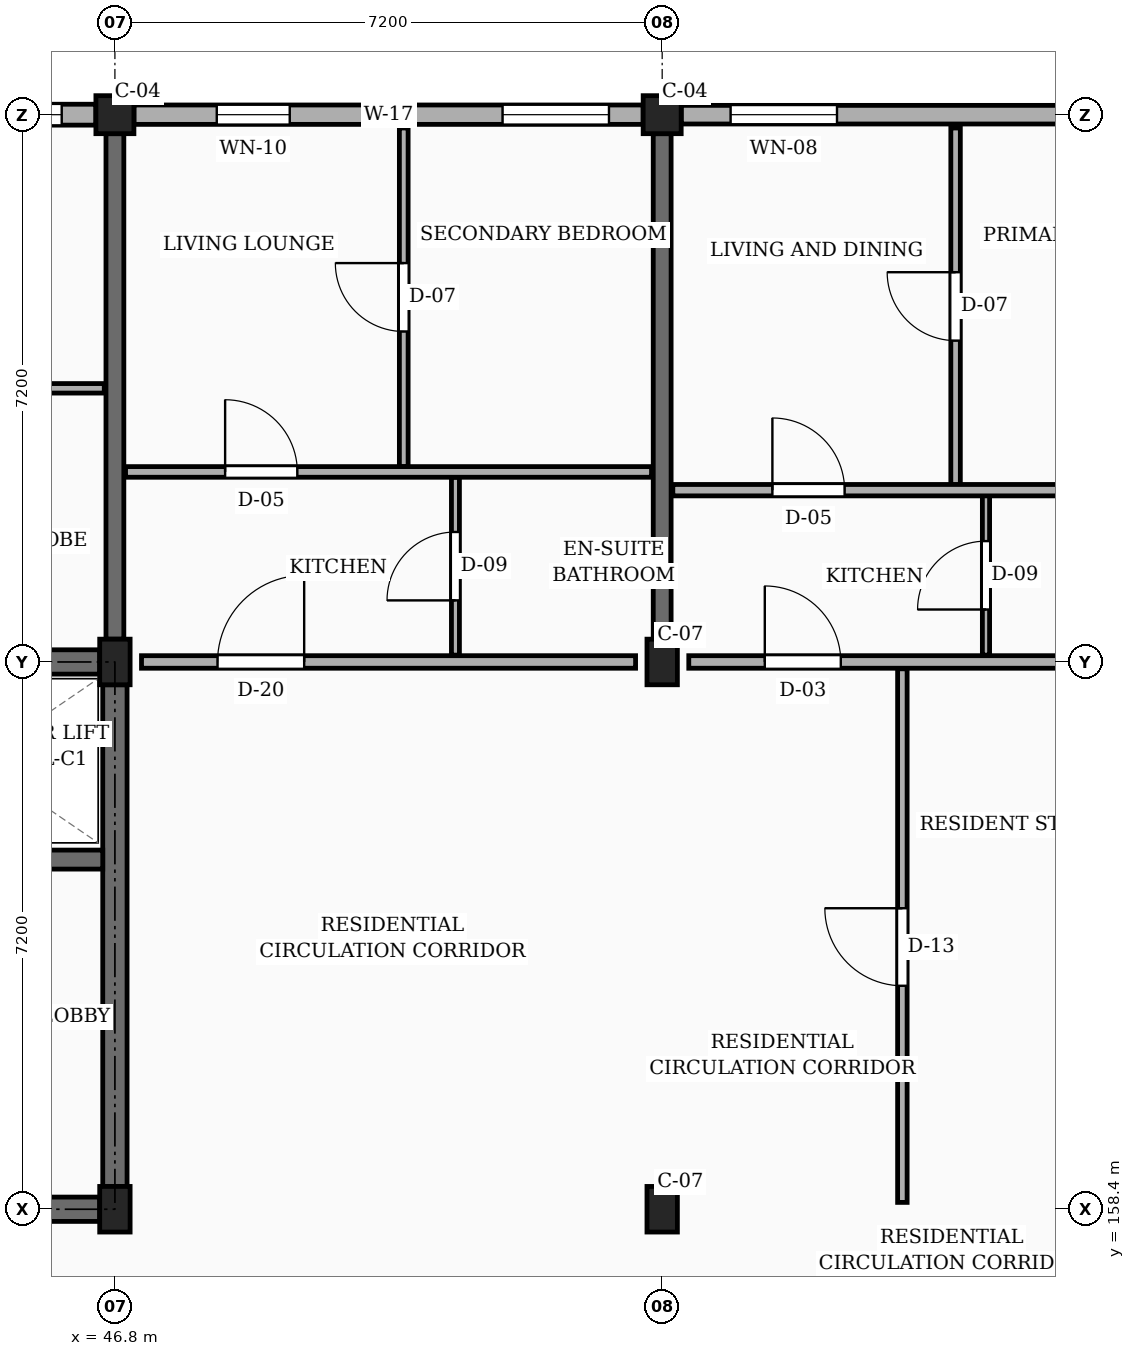
"""IFC4 building model, lengths in metres.
Left out: names, types, materials, properties, quantities, classifications, styles, units other than length and angle.
Written with IfcOpenShell. Run it as: python <this file> out.ifc"""

import sys

from ifc_helpers import new_model, si_unit, direction, frame, frame_2d, origin, origin_2d, place, context, subcontext, project, spatial, rectangle, extrude, element, fill, save


model = new_model("IFC4")
c1 = context("Model", 3, precision=1e-05, world=origin(), true_north=direction((0.0, 1.0)))
c2 = subcontext(c1, "Body", "Model", "MODEL_VIEW")
j1 = project(units=[si_unit("LENGTHUNIT", "METRE"), si_unit("PLANEANGLEUNIT", "RADIAN")], contexts=[c1])
p1 = place(None, origin())
s1 = spatial("IfcSite", under=j1, at=p1, CompositionType="ELEMENT")
p2 = place(p1, origin())
s2 = spatial("IfcBuilding", under=s1, at=p2, CompositionType="ELEMENT")
p3 = place(p2, frame((0.0, 0.0, 23.4)))
s3 = spatial("IfcBuildingStorey", under=s2, at=p3, CompositionType="ELEMENT", Elevation=23.4)
for number, where, z_axis, x_axis in (
    (1, (46.8, 158.4, 0.0), (0.0, 0.0, 1.0), (1.0, 0.0, 0.0)),
    (2, (46.8, 165.6, 0.0), (0.0, 0.0, 1.0), (1.0, 0.0, 0.0)),
):
    element("IfcColumn", number, at=place(p3, frame(where, z_axis=z_axis, x_axis=x_axis)), inside=s3, PredefinedType="COLUMN", context=c2, shape_type="SweptSolid", body=[
        extrude(rectangle(XDim=0.4, YDim=0.6, at=origin_2d()), origin(), (0.0, 0.0, 1.0), 3.15),
    ])
p4 = place(p3, frame((46.8, 172.8, 0.0), z_axis=(0.0, 0.0, 1.0), x_axis=(1.0, 0.0, 0.0)))
e3 = element("IfcColumn", 3, at=p4, inside=s3, PredefinedType="COLUMN", context=c2, shape_type="SweptSolid", body=[
    extrude(rectangle(XDim=0.5, YDim=0.5, at=origin_2d()), origin(), (0.0, 0.0, 1.0), 3.15),
])
for number, where, z_axis, x_axis in (
    (4, (54.0, 158.4, 0.0), (0.0, 0.0, 1.0), (1.0, 0.0, 0.0)),
    (5, (54.0, 165.6, 0.0), (0.0, 0.0, 1.0), (1.0, 0.0, 0.0)),
):
    element("IfcColumn", number, at=place(p3, frame(where, z_axis=z_axis, x_axis=x_axis)), inside=s3, PredefinedType="COLUMN", context=c2, shape_type="SweptSolid", body=[
        extrude(rectangle(XDim=0.4, YDim=0.6, at=origin_2d()), origin(), (0.0, 0.0, 1.0), 3.15),
    ])
p5 = place(p3, frame((54.0, 172.8, 0.0), z_axis=(0.0, 0.0, 1.0), x_axis=(1.0, 0.0, 0.0)))
e6 = element("IfcColumn", 6, at=p5, inside=s3, PredefinedType="COLUMN", context=c2, shape_type="SweptSolid", body=[
    extrude(rectangle(XDim=0.5, YDim=0.5, at=origin_2d()), origin(), (0.0, 0.0, 1.0), 3.15),
])
for number, where, z_axis, x_axis in (
    (7, (46.8, 165.9, 0.0), (0.0, 0.0, 1.0), (0.0, 1.0, 0.0)),
    (8, (54.0, 165.9, 0.0), (0.0, 0.0, 1.0), (0.0, 1.0, 0.0)),
):
    element("IfcWall", number, at=place(p3, frame(where, z_axis=z_axis, x_axis=x_axis)), inside=s3, PredefinedType="SOLIDWALL", context=c2, shape_type="SweptSolid", body=[
        extrude(rectangle(XDim=6.65, YDim=0.235, at=frame_2d((3.325, 0.0))), origin(), (0.0, 0.0, 1.0), 2.185),
    ])
p6 = place(p3, frame((60.95, 172.8, 0.0), z_axis=(0.0, 0.0, 1.0), x_axis=(-1.0, 0.0, 0.0)))
e9 = element("IfcWall", 9, at=p6, inside=s3, PredefinedType="SOLIDWALL", context=c2, shape_type="SweptSolid", body=[
    extrude(rectangle(XDim=6.7, YDim=0.245, at=frame_2d((3.35, 0.0))), origin(), (0.0, 0.0, 1.0), 2.455),
])
p7 = place(p6, frame((0.45, 0.0, 0.78)))
e10 = element("IfcOpeningElement", 10, at=p7, cuts=e9, PredefinedType="OPENING", context=c2, shape_type="SweptSolid", body=[
    extrude(rectangle(XDim=1.24, YDim=1.15, at=frame_2d((0.62, 0.575))), frame((0.0, 0.133, 0.0), z_axis=(0.0, -1.0, 0.0), x_axis=(1.0, 0.0, 0.0)), (0.0, 0.0, 1.0), 0.265),
])
p8 = place(p6, frame((4.65, 0.0, 0.78)))
e11 = element("IfcOpeningElement", 11, at=p8, cuts=e9, PredefinedType="OPENING", context=c2, shape_type="SweptSolid", body=[
    extrude(rectangle(XDim=1.4, YDim=1.15, at=frame_2d((0.7, 0.575))), frame((0.0, 0.133, 0.0), z_axis=(0.0, -1.0, 0.0), x_axis=(1.0, 0.0, 0.0)), (0.0, 0.0, 1.0), 0.265),
])
p9 = place(p3, frame((53.75, 172.8, 0.0), z_axis=(0.0, 0.0, 1.0), x_axis=(-1.0, 0.0, 0.0)))
e12 = element("IfcWall", 12, at=p9, inside=s3, PredefinedType="SOLIDWALL", context=c2, shape_type="SweptSolid", body=[
    extrude(rectangle(XDim=6.7, YDim=0.255, at=frame_2d((3.35, 0.0))), origin(), (0.0, 0.0, 1.0), 2.455),
])
p10 = place(p9, frame((0.45, 0.0, 0.78)))
e13 = element("IfcOpeningElement", 13, at=p10, cuts=e12, PredefinedType="OPENING", context=c2, shape_type="SweptSolid", body=[
    extrude(rectangle(XDim=1.4, YDim=1.15, at=frame_2d((0.7, 0.575))), frame((0.0, 0.137, 0.0), z_axis=(0.0, -1.0, 0.0), x_axis=(1.0, 0.0, 0.0)), (0.0, 0.0, 1.0), 0.275),
])
p11 = place(p9, frame((4.65, 0.0, 0.78)))
e14 = element("IfcOpeningElement", 14, at=p11, cuts=e12, PredefinedType="OPENING", context=c2, shape_type="SweptSolid", body=[
    extrude(rectangle(XDim=0.96, YDim=1.26, at=frame_2d((0.48, 0.63))), frame((0.0, 0.137, 0.0), z_axis=(0.0, -1.0, 0.0), x_axis=(1.0, 0.0, 0.0)), (0.0, 0.0, 1.0), 0.275),
])
p12 = place(p3, frame((46.55, 172.8, 0.0), z_axis=(0.0, 0.0, 1.0), x_axis=(-1.0, 0.0, 0.0)))
e15 = element("IfcWall", 15, at=p12, inside=s3, PredefinedType="SOLIDWALL", context=c2, shape_type="SweptSolid", body=[
    extrude(rectangle(XDim=6.7, YDim=0.275, at=frame_2d((3.35, 0.0))), origin(), (0.0, 0.0, 1.0), 2.455),
])
p13 = place(p12, frame((0.45, 0.0, 0.78)))
e16 = element("IfcOpeningElement", 16, at=p13, cuts=e15, PredefinedType="OPENING", context=c2, shape_type="SweptSolid", body=[
    extrude(rectangle(XDim=0.96, YDim=1.26, at=frame_2d((0.48, 0.63))), frame((0.0, 0.147, 0.0), z_axis=(0.0, -1.0, 0.0), x_axis=(1.0, 0.0, 0.0)), (0.0, 0.0, 1.0), 0.295),
])
p14 = place(p12, frame((4.65, 0.0, 0.78)))
e17 = element("IfcOpeningElement", 17, at=p14, cuts=e15, PredefinedType="OPENING", context=c2, shape_type="SweptSolid", body=[
    extrude(rectangle(XDim=1.12, YDim=1.26, at=frame_2d((0.56, 0.63))), frame((0.0, 0.147, 0.0), z_axis=(0.0, -1.0, 0.0), x_axis=(1.0, 0.0, 0.0)), (0.0, 0.0, 1.0), 0.295),
])
p15 = place(p3, frame((39.8, 165.6, 0.0), z_axis=(0.0, 0.0, 1.0), x_axis=(1.0, 0.0, 0.0)))
e18 = element("IfcWall", 18, at=p15, inside=s3, PredefinedType="SHEAR", context=c2, shape_type="SweptSolid", body=[
    extrude(rectangle(XDim=6.8, YDim=0.32, at=frame_2d((3.4, 0.0))), origin(), (0.0, 0.0, 1.0), 2.885),
])
p16 = place(p3, frame((46.8, 158.7, 0.0), z_axis=(0.0, 0.0, 1.0), x_axis=(0.0, 1.0, 0.0)))
e19 = element("IfcWall", 19, at=p16, inside=s3, PredefinedType="SHEAR", context=c2, shape_type="SweptSolid", body=[
    extrude(rectangle(XDim=6.6, YDim=0.32, at=frame_2d((3.3, 0.0))), origin(), (0.0, 0.0, 1.0), 2.885),
])
p17 = place(p3, frame((39.8, 158.4, 0.0), z_axis=(0.0, 0.0, 1.0), x_axis=(1.0, 0.0, 0.0)))
e20 = element("IfcWall", 20, at=p17, inside=s3, PredefinedType="SHEAR", context=c2, shape_type="SweptSolid", body=[
    extrude(rectangle(XDim=6.8, YDim=0.32, at=frame_2d((3.4, 0.0))), origin(), (0.0, 0.0, 1.0), 2.885),
])
p18 = place(p17, frame((4.55, 0.0, 0.0)))
e21 = element("IfcOpeningElement", 21, at=p18, cuts=e20, PredefinedType="OPENING", context=c2, shape_type="SweptSolid", body=[
    extrude(rectangle(XDim=1.1, YDim=2.15, at=frame_2d((0.55, 1.075))), frame((0.0, 0.17, 0.0), z_axis=(0.0, -1.0, 0.0), x_axis=(1.0, 0.0, 0.0)), (0.0, 0.0, 1.0), 0.34),
])
p19 = place(p3, frame((43.325, 163.0, 0.0), z_axis=(0.0, 0.0, 1.0), x_axis=(1.0, 0.0, 0.0)))
e22 = element("IfcWall", 22, at=p19, inside=s3, PredefinedType="SHEAR", context=c2, shape_type="SweptSolid", body=[
    extrude(rectangle(XDim=3.315, YDim=0.25, at=frame_2d((1.657, 0.0))), origin(), (0.0, 0.0, 1.0), 2.885),
])
p20 = place(p19, frame((1.1, 0.0, 0.0)))
e23 = element("IfcOpeningElement", 23, at=p20, cuts=e22, PredefinedType="OPENING", context=c2, shape_type="SweptSolid", body=[
    extrude(rectangle(XDim=1.0, YDim=2.2, at=frame_2d((0.5, 1.1))), frame((0.0, 0.135, 0.0), z_axis=(0.0, -1.0, 0.0), x_axis=(1.0, 0.0, 0.0)), (0.0, 0.0, 1.0), 0.27),
])
p21 = place(p3, frame((47.15, 165.6, 0.0), z_axis=(0.0, 0.0, 1.0), x_axis=(1.0, 0.0, 0.0)))
e24 = element("IfcWall", 24, at=p21, inside=s3, PredefinedType="PARTITIONING", context=c2, shape_type="SweptSolid", body=[
    extrude(rectangle(XDim=6.5, YDim=0.165, at=frame_2d((3.25, 0.0))), origin(), (0.0, 0.0, 1.0), 2.32),
])
p22 = place(p21, frame((1.0, 0.0, 0.0)))
e25 = element("IfcOpeningElement", 25, at=p22, cuts=e24, PredefinedType="OPENING", context=c2, shape_type="SweptSolid", body=[
    extrude(rectangle(XDim=1.14, YDim=2.18, at=frame_2d((0.57, 1.09))), frame((0.0, 0.093, 0.0), z_axis=(0.0, -1.0, 0.0), x_axis=(1.0, 0.0, 0.0)), (0.0, 0.0, 1.0), 0.185),
])
p23 = place(p3, frame((54.35, 165.6, 0.0), z_axis=(0.0, 0.0, 1.0), x_axis=(1.0, 0.0, 0.0)))
e26 = element("IfcWall", 26, at=p23, inside=s3, PredefinedType="PARTITIONING", context=c2, shape_type="SweptSolid", body=[
    extrude(rectangle(XDim=6.5, YDim=0.165, at=frame_2d((3.25, 0.0))), origin(), (0.0, 0.0, 1.0), 2.32),
])
p24 = place(p23, frame((1.0, 0.0, 0.0)))
e27 = element("IfcOpeningElement", 27, at=p24, cuts=e26, PredefinedType="OPENING", context=c2, shape_type="SweptSolid", body=[
    extrude(rectangle(XDim=1.0, YDim=2.15, at=frame_2d((0.5, 1.075))), frame((0.0, 0.093, 0.0), z_axis=(0.0, -1.0, 0.0), x_axis=(1.0, 0.0, 0.0)), (0.0, 0.0, 1.0), 0.185),
])
p25 = place(p3, frame((39.74, 169.2, 0.0), z_axis=(0.0, 0.0, 1.0), x_axis=(1.0, 0.0, 0.0)))
e28 = element("IfcWall", 28, at=p25, inside=s3, PredefinedType="PARTITIONING", context=c2, shape_type="SweptSolid", body=[
    extrude(rectangle(XDim=6.92, YDim=0.125, at=frame_2d((3.46, 0.0))), origin(), (0.0, 0.0, 1.0), 2.32),
])
p26 = place(p25, frame((1.05, 0.0, 0.0)))
e29 = element("IfcOpeningElement", 29, at=p26, cuts=e28, PredefinedType="OPENING", context=c2, shape_type="SweptSolid", body=[
    extrude(rectangle(XDim=0.87, YDim=2.05, at=frame_2d((0.435, 1.025))), frame((0.0, 0.073, 0.0), z_axis=(0.0, -1.0, 0.0), x_axis=(1.0, 0.0, 0.0)), (0.0, 0.0, 1.0), 0.145),
])
p27 = place(p25, frame((4.45, 0.0, 0.0)))
e30 = element("IfcOpeningElement", 30, at=p27, cuts=e28, PredefinedType="OPENING", context=c2, shape_type="SweptSolid", body=[
    extrude(rectangle(XDim=0.88, YDim=2.08, at=frame_2d((0.44, 1.04))), frame((0.0, 0.073, 0.0), z_axis=(0.0, -1.0, 0.0), x_axis=(1.0, 0.0, 0.0)), (0.0, 0.0, 1.0), 0.145),
])
p28 = place(p3, frame((50.6, 168.17, 0.0), z_axis=(0.0, 0.0, 1.0), x_axis=(0.0, 1.0, 0.0)))
e31 = element("IfcWall", 31, at=p28, inside=s3, PredefinedType="PARTITIONING", context=c2, shape_type="SweptSolid", body=[
    extrude(rectangle(XDim=4.455, YDim=0.115, at=frame_2d((2.228, 0.0))), origin(), (0.0, 0.0, 1.0), 2.32),
])
p29 = place(p28, frame((1.778, 0.0, 0.0)))
e32 = element("IfcOpeningElement", 32, at=p29, cuts=e31, PredefinedType="OPENING", context=c2, shape_type="SweptSolid", body=[
    extrude(rectangle(XDim=0.9, YDim=2.1, at=frame_2d((0.45, 1.05))), frame((0.0, 0.067, 0.0), z_axis=(0.0, -1.0, 0.0), x_axis=(1.0, 0.0, 0.0)), (0.0, 0.0, 1.0), 0.135),
])
p30 = place(p3, frame((51.28, 165.69, 0.0), z_axis=(0.0, 0.0, 1.0), x_axis=(0.0, 1.0, 0.0)))
e33 = element("IfcWall", 33, at=p30, inside=s3, PredefinedType="PARTITIONING", context=c2, shape_type="SweptSolid", body=[
    extrude(rectangle(XDim=2.34, YDim=0.105, at=frame_2d((1.17, 0.0))), origin(), (0.0, 0.0, 1.0), 2.32),
])
p31 = place(p30, frame((0.72, 0.0, 0.0)))
e34 = element("IfcOpeningElement", 34, at=p31, cuts=e33, PredefinedType="OPENING", context=c2, shape_type="SweptSolid", body=[
    extrude(rectangle(XDim=0.9, YDim=2.05, at=frame_2d((0.45, 1.025))), frame((0.0, 0.062, 0.0), z_axis=(0.0, -1.0, 0.0), x_axis=(1.0, 0.0, 0.0)), (0.0, 0.0, 1.0), 0.125),
])
p32 = place(p3, frame((46.94, 168.1, 0.0), z_axis=(0.0, 0.0, 1.0), x_axis=(1.0, 0.0, 0.0)))
e35 = element("IfcWall", 35, at=p32, inside=s3, PredefinedType="PARTITIONING", context=c2, shape_type="SweptSolid", body=[
    extrude(rectangle(XDim=6.92, YDim=0.14, at=frame_2d((3.46, 0.0))), origin(), (0.0, 0.0, 1.0), 2.32),
])
p33 = place(p32, frame((1.31, 0.0, 0.0)))
e36 = element("IfcOpeningElement", 36, at=p33, cuts=e35, PredefinedType="OPENING", context=c2, shape_type="SweptSolid", body=[
    extrude(rectangle(XDim=0.95, YDim=2.1, at=frame_2d((0.475, 1.05))), frame((0.0, 0.08, 0.0), z_axis=(0.0, -1.0, 0.0), x_axis=(1.0, 0.0, 0.0)), (0.0, 0.0, 1.0), 0.16),
])
p34 = place(p3, frame((57.16, 158.49, 0.0), z_axis=(0.0, 0.0, 1.0), x_axis=(0.0, 1.0, 0.0)))
e37 = element("IfcWall", 37, at=p34, inside=s3, PredefinedType="PARTITIONING", context=c2, shape_type="SweptSolid", body=[
    extrude(rectangle(XDim=7.02, YDim=0.125, at=frame_2d((3.51, 0.0))), origin(), (0.0, 0.0, 1.0), 2.32),
])
p35 = place(p34, frame((2.85, 0.0, 0.0)))
e38 = element("IfcOpeningElement", 38, at=p35, cuts=e37, PredefinedType="OPENING", context=c2, shape_type="SweptSolid", body=[
    extrude(rectangle(XDim=1.02, YDim=2.15, at=frame_2d((0.51, 1.075))), frame((0.0, 0.073, 0.0), z_axis=(0.0, -1.0, 0.0), x_axis=(1.0, 0.0, 0.0)), (0.0, 0.0, 1.0), 0.145),
])
p36 = place(p3, frame((57.86, 167.93, 0.0), z_axis=(0.0, 0.0, 1.0), x_axis=(0.0, 1.0, 0.0)))
e39 = element("IfcWall", 39, at=p36, inside=s3, PredefinedType="PARTITIONING", context=c2, shape_type="SweptSolid", body=[
    extrude(rectangle(XDim=4.695, YDim=0.125, at=frame_2d((2.348, 0.0))), origin(), (0.0, 0.0, 1.0), 2.32),
])
p37 = place(p36, frame((1.897, 0.0, 0.0)))
e40 = element("IfcOpeningElement", 40, at=p37, cuts=e39, PredefinedType="OPENING", context=c2, shape_type="SweptSolid", body=[
    extrude(rectangle(XDim=0.9, YDim=2.1, at=frame_2d((0.45, 1.05))), frame((0.0, 0.073, 0.0), z_axis=(0.0, -1.0, 0.0), x_axis=(1.0, 0.0, 0.0)), (0.0, 0.0, 1.0), 0.145),
])
p38 = place(p3, frame((58.26, 165.69, 0.0), z_axis=(0.0, 0.0, 1.0), x_axis=(0.0, 1.0, 0.0)))
e41 = element("IfcWall", 41, at=p38, inside=s3, PredefinedType="PARTITIONING", context=c2, shape_type="SweptSolid", body=[
    extrude(rectangle(XDim=2.1, YDim=0.095, at=frame_2d((1.05, 0.0))), origin(), (0.0, 0.0, 1.0), 2.32),
])
p39 = place(p38, frame((0.6, 0.0, 0.0)))
e42 = element("IfcOpeningElement", 42, at=p39, cuts=e41, PredefinedType="OPENING", context=c2, shape_type="SweptSolid", body=[
    extrude(rectangle(XDim=0.9, YDim=2.05, at=frame_2d((0.45, 1.025))), frame((0.0, 0.058, 0.0), z_axis=(0.0, -1.0, 0.0), x_axis=(1.0, 0.0, 0.0)), (0.0, 0.0, 1.0), 0.115),
])
p40 = place(p3, frame((54.14, 167.86, 0.0), z_axis=(0.0, 0.0, 1.0), x_axis=(1.0, 0.0, 0.0)))
e43 = element("IfcWall", 43, at=p40, inside=s3, PredefinedType="PARTITIONING", context=c2, shape_type="SweptSolid", body=[
    extrude(rectangle(XDim=6.92, YDim=0.15, at=frame_2d((3.46, 0.0))), origin(), (0.0, 0.0, 1.0), 2.32),
])
p41 = place(p40, frame((1.31, 0.0, 0.0)))
e44 = element("IfcOpeningElement", 44, at=p41, cuts=e43, PredefinedType="OPENING", context=c2, shape_type="SweptSolid", body=[
    extrude(rectangle(XDim=0.95, YDim=2.1, at=frame_2d((0.475, 1.05))), frame((0.0, 0.085, 0.0), z_axis=(0.0, -1.0, 0.0), x_axis=(1.0, 0.0, 0.0)), (0.0, 0.0, 1.0), 0.17),
])
p42 = place(p8, origin())
e45 = element("IfcWindow", 45, at=p42, inside=s3, PartitioningType="SINGLE_PANEL", PredefinedType="WINDOW", context=c2, shape_type="SweptSolid", body=[
    extrude(rectangle(XDim=1.4, YDim=1.15, at=frame_2d((0.7, 0.575))), frame((0.0, 0.03, 0.0), z_axis=(0.0, -1.0, 0.0), x_axis=(1.0, 0.0, 0.0)), (0.0, 0.0, 1.0), 0.06),
])
fill(e11, e45)
p43 = place(p10, origin())
e46 = element("IfcWindow", 46, at=p43, inside=s3, PartitioningType="SINGLE_PANEL", PredefinedType="WINDOW", context=c2, shape_type="SweptSolid", body=[
    extrude(rectangle(XDim=1.4, YDim=1.15, at=frame_2d((0.7, 0.575))), frame((0.0, 0.03, 0.0), z_axis=(0.0, -1.0, 0.0), x_axis=(1.0, 0.0, 0.0)), (0.0, 0.0, 1.0), 0.06),
])
fill(e13, e46)
p44 = place(p11, origin())
e47 = element("IfcWindow", 47, at=p44, inside=s3, PartitioningType="SINGLE_PANEL", PredefinedType="WINDOW", context=c2, shape_type="SweptSolid", body=[
    extrude(rectangle(XDim=0.96, YDim=1.26, at=frame_2d((0.48, 0.63))), frame((0.0, 0.03, 0.0), z_axis=(0.0, -1.0, 0.0), x_axis=(1.0, 0.0, 0.0)), (0.0, 0.0, 1.0), 0.06),
])
fill(e14, e47)
p45 = place(p13, origin())
e48 = element("IfcWindow", 48, at=p45, inside=s3, PartitioningType="SINGLE_PANEL", PredefinedType="WINDOW", context=c2, shape_type="SweptSolid", body=[
    extrude(rectangle(XDim=0.96, YDim=1.26, at=frame_2d((0.48, 0.63))), frame((0.0, 0.03, 0.0), z_axis=(0.0, -1.0, 0.0), x_axis=(1.0, 0.0, 0.0)), (0.0, 0.0, 1.0), 0.06),
])
fill(e16, e48)
p46 = place(p22, origin())
e49 = element("IfcDoor", 49, at=p46, inside=s3, OperationType="SINGLE_SWING_RIGHT", PredefinedType="DOOR", context=c2, shape_type="SweptSolid", body=[
    extrude(rectangle(XDim=1.14, YDim=2.18, at=frame_2d((0.57, 1.09))), frame((0.0, 0.025, 0.0), z_axis=(0.0, -1.0, 0.0), x_axis=(1.0, 0.0, 0.0)), (0.0, 0.0, 1.0), 0.05),
])
fill(e25, e49)
p47 = place(p24, origin())
e50 = element("IfcDoor", 50, at=p47, inside=s3, OperationType="SINGLE_SWING_LEFT", PredefinedType="DOOR", context=c2, shape_type="SweptSolid", body=[
    extrude(rectangle(XDim=1.0, YDim=2.15, at=frame_2d((0.5, 1.075))), frame((0.0, 0.025, 0.0), z_axis=(0.0, -1.0, 0.0), x_axis=(1.0, 0.0, 0.0)), (0.0, 0.0, 1.0), 0.05),
])
fill(e27, e50)
p48 = place(p29, origin())
e51 = element("IfcDoor", 51, at=p48, inside=s3, OperationType="SINGLE_SWING_RIGHT", PredefinedType="DOOR", context=c2, shape_type="SweptSolid", body=[
    extrude(rectangle(XDim=0.9, YDim=2.1, at=frame_2d((0.45, 1.05))), frame((0.0, 0.025, 0.0), z_axis=(0.0, -1.0, 0.0), x_axis=(1.0, 0.0, 0.0)), (0.0, 0.0, 1.0), 0.05),
])
fill(e32, e51)
p49 = place(p31, origin())
e52 = element("IfcDoor", 52, at=p49, inside=s3, OperationType="SINGLE_SWING_LEFT", PredefinedType="DOOR", context=c2, shape_type="SweptSolid", body=[
    extrude(rectangle(XDim=0.9, YDim=2.05, at=frame_2d((0.45, 1.025))), frame((0.0, 0.025, 0.0), z_axis=(0.0, -1.0, 0.0), x_axis=(1.0, 0.0, 0.0)), (0.0, 0.0, 1.0), 0.05),
])
fill(e34, e52)
p50 = place(p33, origin())
e53 = element("IfcDoor", 53, at=p50, inside=s3, OperationType="SINGLE_SWING_LEFT", PredefinedType="DOOR", context=c2, shape_type="SweptSolid", body=[
    extrude(rectangle(XDim=0.95, YDim=2.1, at=frame_2d((0.475, 1.05))), frame((0.0, 0.025, 0.0), z_axis=(0.0, -1.0, 0.0), x_axis=(1.0, 0.0, 0.0)), (0.0, 0.0, 1.0), 0.05),
])
fill(e36, e53)
p51 = place(p35, origin())
e54 = element("IfcDoor", 54, at=p51, inside=s3, OperationType="SINGLE_SWING_RIGHT", PredefinedType="DOOR", context=c2, shape_type="SweptSolid", body=[
    extrude(rectangle(XDim=1.02, YDim=2.15, at=frame_2d((0.51, 1.075))), frame((0.0, 0.025, 0.0), z_axis=(0.0, -1.0, 0.0), x_axis=(1.0, 0.0, 0.0)), (0.0, 0.0, 1.0), 0.05),
])
fill(e38, e54)
p52 = place(p37, origin())
e55 = element("IfcDoor", 55, at=p52, inside=s3, OperationType="SINGLE_SWING_RIGHT", PredefinedType="DOOR", context=c2, shape_type="SweptSolid", body=[
    extrude(rectangle(XDim=0.9, YDim=2.1, at=frame_2d((0.45, 1.05))), frame((0.0, 0.025, 0.0), z_axis=(0.0, -1.0, 0.0), x_axis=(1.0, 0.0, 0.0)), (0.0, 0.0, 1.0), 0.05),
])
fill(e40, e55)
p53 = place(p39, origin())
e56 = element("IfcDoor", 56, at=p53, inside=s3, OperationType="SINGLE_SWING_LEFT", PredefinedType="DOOR", context=c2, shape_type="SweptSolid", body=[
    extrude(rectangle(XDim=0.9, YDim=2.05, at=frame_2d((0.45, 1.025))), frame((0.0, 0.025, 0.0), z_axis=(0.0, -1.0, 0.0), x_axis=(1.0, 0.0, 0.0)), (0.0, 0.0, 1.0), 0.05),
])
fill(e42, e56)
p54 = place(p41, origin())
e57 = element("IfcDoor", 57, at=p54, inside=s3, OperationType="SINGLE_SWING_LEFT", PredefinedType="DOOR", context=c2, shape_type="SweptSolid", body=[
    extrude(rectangle(XDim=0.95, YDim=2.1, at=frame_2d((0.475, 1.05))), frame((0.0, 0.025, 0.0), z_axis=(0.0, -1.0, 0.0), x_axis=(1.0, 0.0, 0.0)), (0.0, 0.0, 1.0), 0.05),
])
fill(e44, e57)
save(model, sys.argv[1])
